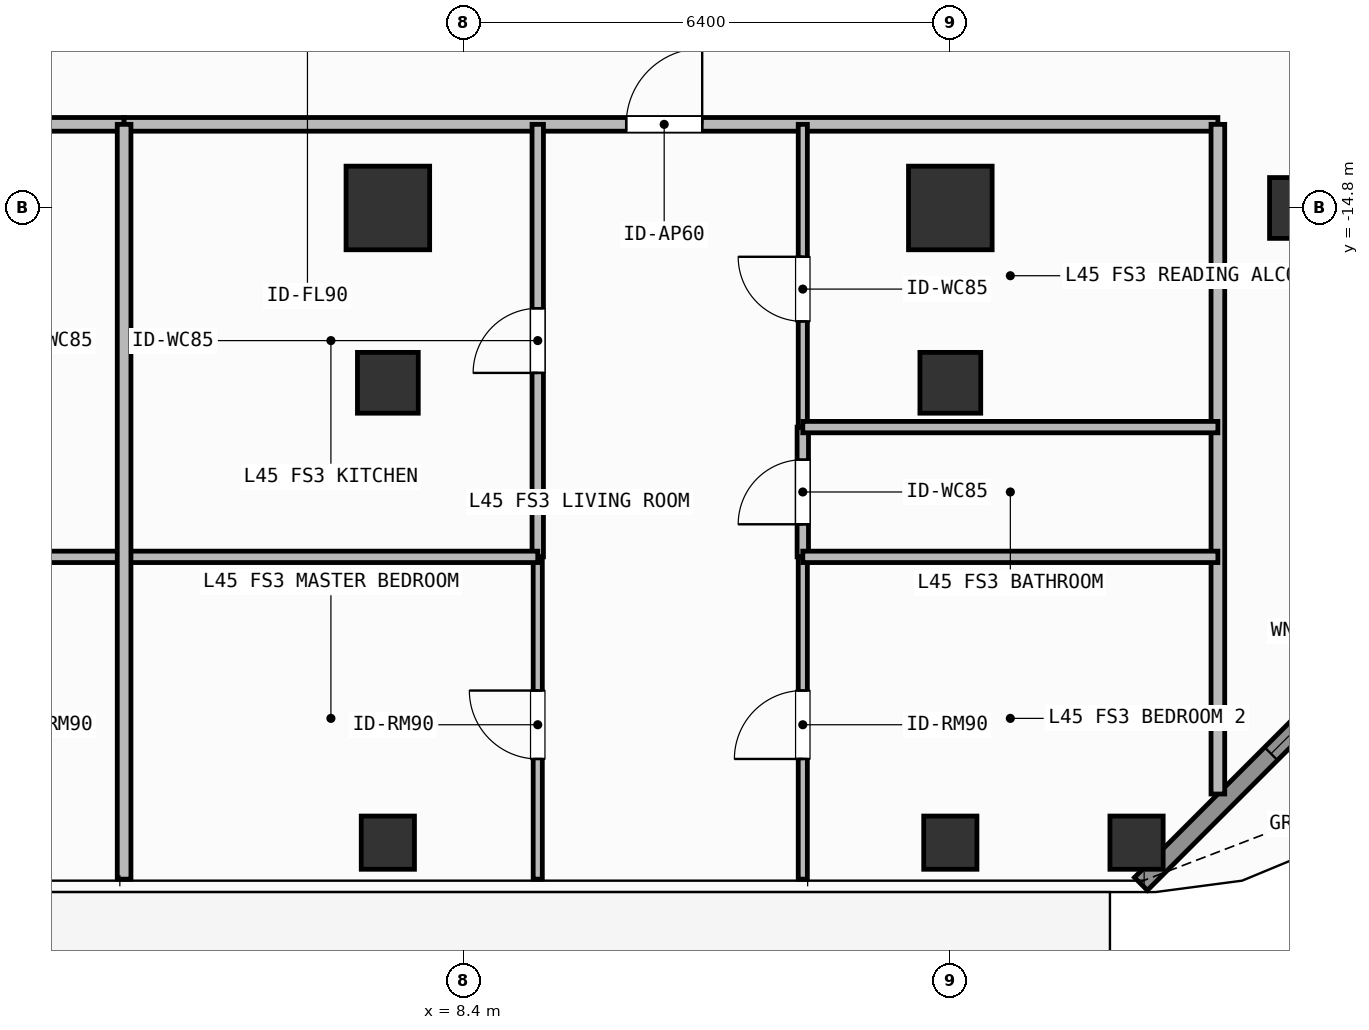
"""IFC4 building model, lengths in metres.
Left out: names, types, materials, properties, quantities, classifications, styles, units other than length and angle.
Written with IfcOpenShell. Run it as: python <this file> out.ifc"""

import sys

from ifc_helpers import new_model, si_unit, direction, frame, frame_2d, origin, origin_2d, place, context, subcontext, project, spatial, rectangle, hollow_rectangle, extrude, element, fill, save


model = new_model("IFC4")
c1 = context("Model", 3, precision=1e-05, world=origin(), true_north=direction((0.0, 1.0)))
c2 = subcontext(c1, "Body", "Model", "MODEL_VIEW")
j1 = project(units=[si_unit("LENGTHUNIT", "METRE"), si_unit("PLANEANGLEUNIT", "RADIAN")], contexts=[c1])
p1 = place(None, origin())
s1 = spatial("IfcSite", under=j1, at=p1, CompositionType="ELEMENT")
p2 = place(p1, origin())
s2 = spatial("IfcBuilding", under=s1, at=p2, CompositionType="ELEMENT")
p3 = place(p2, frame((0.0, 0.0, 183.6)))
s3 = spatial("IfcBuildingStorey", under=s2, at=p3, CompositionType="ELEMENT", Elevation=183.6)
for number, where, z_axis, x_axis in (
    (1, (7.4, -14.8, 0.0), (0.0, 0.0, 1.0), (1.0, 0.0, 0.0)),
    (2, (14.8, -14.8, 0.0), (0.0, 0.0, 1.0), (1.0, 0.0, 0.0)),
):
    element("IfcColumn", number, at=place(p3, frame(where, z_axis=z_axis, x_axis=x_axis)), inside=s3, PredefinedType="COLUMN", context=c2, shape_type="SweptSolid", body=[
        extrude(rectangle(XDim=1.1, YDim=1.1, at=origin_2d()), origin(), (0.0, 0.0, 1.0), 3.9),
    ])
for number, where, z_axis, x_axis in (
    (3, (19.4, -14.8, 0.0), (0.0, 0.0, 1.0), (1.0, 0.0, 0.0)),
    (4, (7.4, -17.1, 0.0), (0.0, 0.0, 1.0), (1.0, 0.0, 0.0)),
    (5, (14.8, -17.1, 0.0), (0.0, 0.0, 1.0), (1.0, 0.0, 0.0)),
):
    element("IfcColumn", number, at=place(p3, frame(where, z_axis=z_axis, x_axis=x_axis)), inside=s3, PredefinedType="COLUMN", context=c2, shape_type="SweptSolid", body=[
        extrude(hollow_rectangle(XDim=0.8, YDim=0.8, WallThickness=0.036, at=origin_2d()), origin(), (0.0, 0.0, 1.0), 3.9),
    ])
for number, where, z_axis, x_axis in (
    (6, (17.25, -23.15, 0.0), (0.0, 0.0, 1.0), (1.0, 0.0, 0.0)),
    (7, (7.4, -23.15, 0.0), (0.0, 0.0, 1.0), (1.0, 0.0, 0.0)),
    (8, (14.8, -23.15, 0.0), (0.0, 0.0, 1.0), (1.0, 0.0, 0.0)),
):
    element("IfcColumn", number, at=place(p3, frame(where, z_axis=z_axis, x_axis=x_axis)), inside=s3, PredefinedType="COLUMN", context=c2, shape_type="SweptSolid", body=[
        extrude(hollow_rectangle(XDim=0.7, YDim=0.7, WallThickness=0.032, at=origin_2d()), origin(), (0.0, 0.0, 1.0), 3.9),
    ])
p4 = place(p3, frame((21.792, -19.208, 0.0), z_axis=(0.0, 0.0, 1.0), x_axis=(-0.707106781187, -0.707106781187, 0.0)))
e9 = element("IfcWall", 9, at=p4, inside=s3, PredefinedType="SOLIDWALL", context=c2, shape_type="SweptSolid", body=[
    extrude(rectangle(XDim=6.343, YDim=0.24, at=frame_2d((3.171, 0.0))), origin(), (0.0, 0.0, 1.0), 3.68),
])
p5 = place(p4, frame((2.421, 0.0, 0.8)))
e10 = element("IfcOpeningElement", 10, at=p5, cuts=e9, PredefinedType="OPENING", context=c2, shape_type="SweptSolid", body=[
    extrude(rectangle(XDim=1.5, YDim=1.85, at=frame_2d((0.75, 0.925))), frame((0.0, 0.13, 0.0), z_axis=(0.0, -1.0, 0.0), x_axis=(1.0, 0.0, 0.0)), (0.0, 0.0, 1.0), 0.26),
])
p6 = place(p3, frame((-6.618, -13.7, 0.0), z_axis=(0.0, 0.0, 1.0), x_axis=(1.0, 0.0, 0.0)))
e11 = element("IfcWall", 11, at=p6, inside=s3, PredefinedType="PARTITIONING", context=c2, shape_type="SweptSolid", body=[
    extrude(rectangle(XDim=10.548, YDim=0.18, at=frame_2d((5.274, 0.0))), origin(), (0.0, 0.0, 1.0), 3.68),
])
p7 = place(p6, frame((4.951, 0.0, 0.0)))
e12 = element("IfcOpeningElement", 12, at=p7, cuts=e11, PredefinedType="OPENING", context=c2, shape_type="SweptSolid", body=[
    extrude(rectangle(XDim=1.0, YDim=2.2, at=frame_2d((0.5, 1.1))), frame((0.0, 0.1, 0.0), z_axis=(0.0, -1.0, 0.0), x_axis=(1.0, 0.0, 0.0)), (0.0, 0.0, 1.0), 0.2),
])
p8 = place(p3, frame((3.93, -13.7, 0.0), z_axis=(0.0, 0.0, 1.0), x_axis=(1.0, 0.0, 0.0)))
e13 = element("IfcWall", 13, at=p8, inside=s3, PredefinedType="PARTITIONING", context=c2, shape_type="SweptSolid", body=[
    extrude(rectangle(XDim=14.39, YDim=0.18, at=frame_2d((7.195, 0.0))), origin(), (0.0, 0.0, 1.0), 3.68),
])
p9 = place(p8, frame((6.605, 0.0, 0.0)))
e14 = element("IfcOpeningElement", 14, at=p9, cuts=e13, PredefinedType="OPENING", context=c2, shape_type="SweptSolid", body=[
    extrude(rectangle(XDim=1.0, YDim=2.2, at=frame_2d((0.5, 1.1))), frame((0.0, 0.1, 0.0), z_axis=(0.0, -1.0, 0.0), x_axis=(1.0, 0.0, 0.0)), (0.0, 0.0, 1.0), 0.2),
])
p10 = place(p3, frame((9.372, -19.39, 0.0), z_axis=(0.0, 0.0, 1.0), x_axis=(0.0, 1.0, 0.0)))
e15 = element("IfcWall", 15, at=p10, inside=s3, PredefinedType="PARTITIONING", context=c2, shape_type="SweptSolid", body=[
    extrude(rectangle(XDim=5.69, YDim=0.15, at=frame_2d((2.845, 0.0))), origin(), (0.0, 0.0, 1.0), 3.68),
])
p11 = place(p10, frame((2.42, 0.0, 0.0)))
e16 = element("IfcOpeningElement", 16, at=p11, cuts=e15, PredefinedType="OPENING", context=c2, shape_type="SweptSolid", body=[
    extrude(rectangle(XDim=0.85, YDim=2.1, at=frame_2d((0.425, 1.05))), frame((0.0, 0.085, 0.0), z_axis=(0.0, -1.0, 0.0), x_axis=(1.0, 0.0, 0.0)), (0.0, 0.0, 1.0), 0.17),
])
p12 = place(p3, frame((9.372, -23.63, 0.0), z_axis=(0.0, 0.0, 1.0), x_axis=(0.0, 1.0, 0.0)))
e17 = element("IfcWall", 17, at=p12, inside=s3, PredefinedType="PARTITIONING", context=c2, shape_type="SweptSolid", body=[
    extrude(rectangle(XDim=4.24, YDim=0.12, at=frame_2d((2.12, 0.0))), origin(), (0.0, 0.0, 1.0), 3.68),
])
p13 = place(p12, frame((1.581, 0.0, 0.0)))
e18 = element("IfcOpeningElement", 18, at=p13, cuts=e17, PredefinedType="OPENING", context=c2, shape_type="SweptSolid", body=[
    extrude(rectangle(XDim=0.9, YDim=2.1, at=frame_2d((0.45, 1.05))), frame((0.0, 0.07, 0.0), z_axis=(0.0, -1.0, 0.0), x_axis=(1.0, 0.0, 0.0)), (0.0, 0.0, 1.0), 0.14),
])
p14 = place(p3, frame((12.859, -19.39, 0.0), z_axis=(0.0, 0.0, 1.0), x_axis=(0.0, 1.0, 0.0)))
e19 = element("IfcWall", 19, at=p14, inside=s3, PredefinedType="PARTITIONING", context=c2, shape_type="SweptSolid", body=[
    extrude(rectangle(XDim=1.707, YDim=0.15, at=frame_2d((0.854, 0.0))), origin(), (0.0, 0.0, 1.0), 3.68),
])
p15 = place(p14, frame((0.428, 0.0, 0.0)))
e20 = element("IfcOpeningElement", 20, at=p15, cuts=e19, PredefinedType="OPENING", context=c2, shape_type="SweptSolid", body=[
    extrude(rectangle(XDim=0.85, YDim=2.1, at=frame_2d((0.425, 1.05))), frame((0.0, 0.085, 0.0), z_axis=(0.0, -1.0, 0.0), x_axis=(1.0, 0.0, 0.0)), (0.0, 0.0, 1.0), 0.17),
])
p16 = place(p3, frame((12.859, -17.683, 0.0), z_axis=(0.0, 0.0, 1.0), x_axis=(0.0, 1.0, 0.0)))
e21 = element("IfcWall", 21, at=p16, inside=s3, PredefinedType="PARTITIONING", context=c2, shape_type="SweptSolid", body=[
    extrude(rectangle(XDim=3.983, YDim=0.12, at=frame_2d((1.992, 0.0))), origin(), (0.0, 0.0, 1.0), 3.68),
])
p17 = place(p16, frame((1.391, 0.0, 0.0)))
e22 = element("IfcOpeningElement", 22, at=p17, cuts=e21, PredefinedType="OPENING", context=c2, shape_type="SweptSolid", body=[
    extrude(rectangle(XDim=0.85, YDim=2.1, at=frame_2d((0.425, 1.05))), frame((0.0, 0.07, 0.0), z_axis=(0.0, -1.0, 0.0), x_axis=(1.0, 0.0, 0.0)), (0.0, 0.0, 1.0), 0.14),
])
p18 = place(p3, frame((12.859, -23.63, 0.0), z_axis=(0.0, 0.0, 1.0), x_axis=(0.0, 1.0, 0.0)))
e23 = element("IfcWall", 23, at=p18, inside=s3, PredefinedType="PARTITIONING", context=c2, shape_type="SweptSolid", body=[
    extrude(rectangle(XDim=4.24, YDim=0.12, at=frame_2d((2.12, 0.0))), origin(), (0.0, 0.0, 1.0), 3.68),
])
p19 = place(p18, frame((1.581, 0.0, 0.0)))
e24 = element("IfcOpeningElement", 24, at=p19, cuts=e23, PredefinedType="OPENING", context=c2, shape_type="SweptSolid", body=[
    extrude(rectangle(XDim=0.9, YDim=2.1, at=frame_2d((0.45, 1.05))), frame((0.0, 0.07, 0.0), z_axis=(0.0, -1.0, 0.0), x_axis=(1.0, 0.0, 0.0)), (0.0, 0.0, 1.0), 0.14),
])
p20 = place(p3, frame((18.32, -22.51, 0.0), z_axis=(0.0, 0.0, 1.0), x_axis=(0.0, 1.0, 0.0)))
e25 = element("IfcWall", 25, at=p20, inside=s3, PredefinedType="PARTITIONING", context=c2, shape_type="SweptSolid", body=[
    extrude(rectangle(XDim=8.81, YDim=0.18, at=frame_2d((4.405, 0.0))), origin(), (0.0, 0.0, 1.0), 3.68),
])
p21 = place(p3, frame((1.08, -19.39, 0.0), z_axis=(0.0, 0.0, 1.0), x_axis=(1.0, 0.0, 0.0)))
e26 = element("IfcWall", 26, at=p21, inside=s3, PredefinedType="PARTITIONING", context=c2, shape_type="SweptSolid", body=[
    extrude(rectangle(XDim=2.85, YDim=0.15, at=frame_2d((1.425, 0.0))), origin(), (0.0, 0.0, 1.0), 3.68),
])
p22 = place(p3, frame((3.93, -19.39, 0.0), z_axis=(0.0, 0.0, 1.0), x_axis=(1.0, 0.0, 0.0)))
e27 = element("IfcWall", 27, at=p22, inside=s3, PredefinedType="PARTITIONING", context=c2, shape_type="SweptSolid", body=[
    extrude(rectangle(XDim=5.442, YDim=0.15, at=frame_2d((2.721, 0.0))), origin(), (0.0, 0.0, 1.0), 3.68),
])
for number, where, z_axis, x_axis in (
    (28, (12.859, -17.683, 0.0), (0.0, 0.0, 1.0), (1.0, 0.0, 0.0)),
    (29, (12.859, -19.39, 0.0), (0.0, 0.0, 1.0), (1.0, 0.0, 0.0)),
):
    element("IfcWall", number, at=place(p3, frame(where, z_axis=z_axis, x_axis=x_axis)), inside=s3, PredefinedType="PARTITIONING", context=c2, shape_type="SweptSolid", body=[
        extrude(rectangle(XDim=5.461, YDim=0.15, at=frame_2d((2.73, 0.0))), origin(), (0.0, 0.0, 1.0), 3.68),
    ])
p23 = place(p3, frame((3.93, -23.63, 0.0), z_axis=(0.0, 0.0, 1.0), x_axis=(0.0, 1.0, 0.0)))
e30 = element("IfcWall", 30, at=p23, inside=s3, PredefinedType="PARTITIONING", context=c2, shape_type="SweptSolid", body=[
    extrude(rectangle(XDim=9.93, YDim=0.18, at=frame_2d((4.965, 0.0))), origin(), (0.0, 0.0, 1.0), 3.68),
])
p24 = place(p5, origin())
e31 = element("IfcWindow", 31, at=p24, inside=s3, PartitioningType="SINGLE_PANEL", PredefinedType="WINDOW", context=c2, shape_type="SweptSolid", body=[
    extrude(rectangle(XDim=1.5, YDim=1.85, at=frame_2d((0.75, 0.925))), frame((0.0, 0.03, 0.0), z_axis=(0.0, -1.0, 0.0), x_axis=(1.0, 0.0, 0.0)), (0.0, 0.0, 1.0), 0.06),
])
fill(e10, e31)
p25 = place(p9, origin())
e32 = element("IfcDoor", 32, at=p25, inside=s3, OperationType="SINGLE_SWING_RIGHT", PredefinedType="DOOR", context=c2, shape_type="SweptSolid", body=[
    extrude(rectangle(XDim=1.0, YDim=2.2, at=frame_2d((0.5, 1.1))), frame((0.0, 0.025, 0.0), z_axis=(0.0, -1.0, 0.0), x_axis=(1.0, 0.0, 0.0)), (0.0, 0.0, 1.0), 0.05),
])
fill(e14, e32)
p26 = place(p11, origin())
e33 = element("IfcDoor", 33, at=p26, inside=s3, OperationType="SINGLE_SWING_LEFT", PredefinedType="DOOR", context=c2, shape_type="SweptSolid", body=[
    extrude(rectangle(XDim=0.85, YDim=2.1, at=frame_2d((0.425, 1.05))), frame((0.0, 0.025, 0.0), z_axis=(0.0, -1.0, 0.0), x_axis=(1.0, 0.0, 0.0)), (0.0, 0.0, 1.0), 0.05),
])
fill(e16, e33)
p27 = place(p13, origin())
e34 = element("IfcDoor", 34, at=p27, inside=s3, OperationType="SINGLE_SWING_RIGHT", PredefinedType="DOOR", context=c2, shape_type="SweptSolid", body=[
    extrude(rectangle(XDim=0.9, YDim=2.1, at=frame_2d((0.45, 1.05))), frame((0.0, 0.025, 0.0), z_axis=(0.0, -1.0, 0.0), x_axis=(1.0, 0.0, 0.0)), (0.0, 0.0, 1.0), 0.05),
])
fill(e18, e34)
p28 = place(p15, origin())
e35 = element("IfcDoor", 35, at=p28, inside=s3, OperationType="SINGLE_SWING_LEFT", PredefinedType="DOOR", context=c2, shape_type="SweptSolid", body=[
    extrude(rectangle(XDim=0.85, YDim=2.1, at=frame_2d((0.425, 1.05))), frame((0.0, 0.025, 0.0), z_axis=(0.0, -1.0, 0.0), x_axis=(1.0, 0.0, 0.0)), (0.0, 0.0, 1.0), 0.05),
])
fill(e20, e35)
p29 = place(p17, origin())
e36 = element("IfcDoor", 36, at=p29, inside=s3, OperationType="SINGLE_SWING_RIGHT", PredefinedType="DOOR", context=c2, shape_type="SweptSolid", body=[
    extrude(rectangle(XDim=0.85, YDim=2.1, at=frame_2d((0.425, 1.05))), frame((0.0, 0.025, 0.0), z_axis=(0.0, -1.0, 0.0), x_axis=(1.0, 0.0, 0.0)), (0.0, 0.0, 1.0), 0.05),
])
fill(e22, e36)
p30 = place(p19, origin())
e37 = element("IfcDoor", 37, at=p30, inside=s3, OperationType="SINGLE_SWING_LEFT", PredefinedType="DOOR", context=c2, shape_type="SweptSolid", body=[
    extrude(rectangle(XDim=0.9, YDim=2.1, at=frame_2d((0.45, 1.05))), frame((0.0, 0.025, 0.0), z_axis=(0.0, -1.0, 0.0), x_axis=(1.0, 0.0, 0.0)), (0.0, 0.0, 1.0), 0.05),
])
fill(e24, e37)
save(model, sys.argv[1])
